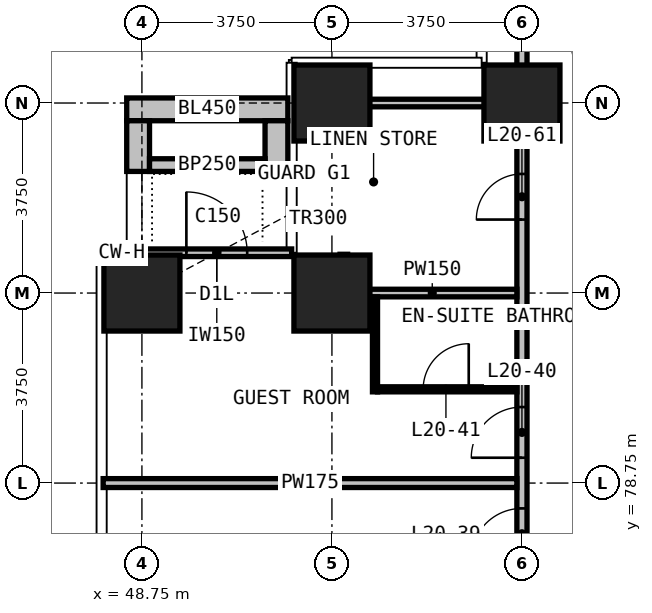
"""IFC4 building model, lengths in metres.
Left out: names, types, materials, properties, quantities, classifications, styles, units other than length and angle.
Written with IfcOpenShell. Run it as: python <this file> out.ifc"""

import sys

from ifc_helpers import new_model, si_unit, direction, frame, frame_2d, origin, origin_2d, place, context, subcontext, project, spatial, rectangle, extrude, element, fill, save


model = new_model("IFC4")
c1 = context("Model", 3, precision=1e-05, world=origin(), true_north=direction((0.0, 1.0)))
c2 = subcontext(c1, "Body", "Model", "MODEL_VIEW")
j1 = project(units=[si_unit("LENGTHUNIT", "METRE"), si_unit("PLANEANGLEUNIT", "RADIAN")], contexts=[c1])
p1 = place(None, origin())
s1 = spatial("IfcSite", under=j1, at=p1, CompositionType="ELEMENT")
p2 = place(p1, origin())
s2 = spatial("IfcBuilding", under=s1, at=p2, CompositionType="ELEMENT")
p3 = place(p2, frame((0.0, 0.0, 85.7)))
s3 = spatial("IfcBuildingStorey", under=s2, at=p3, CompositionType="ELEMENT", Elevation=85.7)
for number, where, z_axis, x_axis in (
    (1, (48.75, 82.5, 0.0), (0.0, 0.0, 1.0), (1.0, 0.0, 0.0)),
    (2, (52.5, 82.5, 0.0), (0.0, 0.0, 1.0), (1.0, 0.0, 0.0)),
    (3, (52.5, 86.25, 0.0), (0.0, 0.0, 1.0), (1.0, 0.0, 0.0)),
    (4, (56.25, 86.25, 0.0), (0.0, 0.0, 1.0), (1.0, 0.0, 0.0)),
):
    element("IfcColumn", number, at=place(p3, frame(where, z_axis=z_axis, x_axis=x_axis)), inside=s3, PredefinedType="COLUMN", context=c2, shape_type="SweptSolid", body=[
        extrude(rectangle(XDim=1.5, YDim=1.5, at=origin_2d()), origin(), (0.0, 0.0, 1.0), 3.3),
    ])
p4 = place(p3, frame((48.75, 83.295, 0.0), z_axis=(0.0, 0.0, 1.0), x_axis=(1.0, 0.0, 0.0)))
e5 = element("IfcWall", 5, at=p4, inside=s3, PredefinedType="SOLIDWALL", context=c2, shape_type="SweptSolid", body=[
    extrude(rectangle(XDim=2.955, YDim=0.15, at=frame_2d((1.478, 0.0))), origin(), (0.0, 0.0, 1.0), 3.0),
])
p5 = place(p4, frame((0.877, 0.0, 0.0)))
e6 = element("IfcOpeningElement", 6, at=p5, cuts=e5, PredefinedType="OPENING", context=c2, shape_type="SweptSolid", body=[
    extrude(rectangle(XDim=1.2, YDim=2.0, at=frame_2d((0.6, 1.0))), frame((0.0, 0.085, 0.0), z_axis=(0.0, -1.0, 0.0), x_axis=(1.0, 0.0, 0.0)), (0.0, 0.0, 1.0), 0.17),
])
p6 = place(p3, frame((48.45, 86.125, 0.0), z_axis=(0.0, 0.0, 1.0), x_axis=(1.0, 0.0, 0.0)))
e7 = element("IfcWall", 7, at=p6, inside=s3, PredefinedType="USERDEFINED", context=c2, shape_type="SweptSolid", body=[
    extrude(rectangle(XDim=3.18, YDim=0.45, at=frame_2d((1.59, 0.0))), origin(), (0.0, 0.0, 1.0), 1.1),
])
for number, where, z_axis, x_axis in (
    (8, (48.675, 84.9, 0.0), (0.0, 0.0, 1.0), (0.0, 1.0, 0.0)),
    (9, (51.405, 84.9, 0.0), (0.0, 0.0, 1.0), (0.0, 1.0, 0.0)),
):
    element("IfcWall", number, at=place(p3, frame(where, z_axis=z_axis, x_axis=x_axis)), inside=s3, PredefinedType="USERDEFINED", context=c2, shape_type="SweptSolid", body=[
        extrude(rectangle(XDim=1.0, YDim=0.45, at=frame_2d((0.5, 0.0))), origin(), (0.0, 0.0, 1.0), 1.1),
    ])
p7 = place(p3, frame((48.9, 85.025, 0.0), z_axis=(0.0, 0.0, 1.0), x_axis=(1.0, 0.0, 0.0)))
e10 = element("IfcWall", 10, at=p7, inside=s3, PredefinedType="USERDEFINED", context=c2, shape_type="SweptSolid", body=[
    extrude(rectangle(XDim=2.28, YDim=0.25, at=frame_2d((1.14, 0.0))), origin(), (0.0, 0.0, 1.0), 1.0),
])
p8 = place(p3, frame((56.25, 52.4, 0.0), z_axis=(0.0, 0.0, 1.0), x_axis=(0.0, 1.0, 0.0)))
e11 = element("IfcWall", 11, at=p8, inside=s3, PredefinedType="PARTITIONING", context=c2, shape_type="SweptSolid", body=[
    extrude(rectangle(XDim=33.925, YDim=0.2, at=frame_2d((16.962, 0.0))), origin(), (0.0, 0.0, 1.0), 3.0),
])
p9 = place(p8, frame((2.35, 0.0, 0.0)))
e12 = element("IfcOpeningElement", 12, at=p9, cuts=e11, PredefinedType="OPENING", context=c2, shape_type="SweptSolid", body=[
    extrude(rectangle(XDim=1.0, YDim=2.2, at=frame_2d((0.5, 1.1))), frame((0.0, 0.11, 0.0), z_axis=(0.0, -1.0, 0.0), x_axis=(1.0, 0.0, 0.0)), (0.0, 0.0, 1.0), 0.22),
])
p10 = place(p8, frame((4.35, 0.0, 0.0)))
e13 = element("IfcOpeningElement", 13, at=p10, cuts=e11, PredefinedType="OPENING", context=c2, shape_type="SweptSolid", body=[
    extrude(rectangle(XDim=1.0, YDim=2.2, at=frame_2d((0.5, 1.1))), frame((0.0, 0.11, 0.0), z_axis=(0.0, -1.0, 0.0), x_axis=(1.0, 0.0, 0.0)), (0.0, 0.0, 1.0), 0.22),
])
p11 = place(p8, frame((9.85, 0.0, 0.0)))
e14 = element("IfcOpeningElement", 14, at=p11, cuts=e11, PredefinedType="OPENING", context=c2, shape_type="SweptSolid", body=[
    extrude(rectangle(XDim=1.0, YDim=2.2, at=frame_2d((0.5, 1.1))), frame((0.0, 0.11, 0.0), z_axis=(0.0, -1.0, 0.0), x_axis=(1.0, 0.0, 0.0)), (0.0, 0.0, 1.0), 0.22),
])
p12 = place(p8, frame((11.85, 0.0, 0.0)))
e15 = element("IfcOpeningElement", 15, at=p12, cuts=e11, PredefinedType="OPENING", context=c2, shape_type="SweptSolid", body=[
    extrude(rectangle(XDim=1.0, YDim=2.2, at=frame_2d((0.5, 1.1))), frame((0.0, 0.11, 0.0), z_axis=(0.0, -1.0, 0.0), x_axis=(1.0, 0.0, 0.0)), (0.0, 0.0, 1.0), 0.22),
])
p13 = place(p8, frame((17.35, 0.0, 0.0)))
e16 = element("IfcOpeningElement", 16, at=p13, cuts=e11, PredefinedType="OPENING", context=c2, shape_type="SweptSolid", body=[
    extrude(rectangle(XDim=1.0, YDim=2.2, at=frame_2d((0.5, 1.1))), frame((0.0, 0.11, 0.0), z_axis=(0.0, -1.0, 0.0), x_axis=(1.0, 0.0, 0.0)), (0.0, 0.0, 1.0), 0.22),
])
p14 = place(p8, frame((19.35, 0.0, 0.0)))
e17 = element("IfcOpeningElement", 17, at=p14, cuts=e11, PredefinedType="OPENING", context=c2, shape_type="SweptSolid", body=[
    extrude(rectangle(XDim=1.0, YDim=2.2, at=frame_2d((0.5, 1.1))), frame((0.0, 0.11, 0.0), z_axis=(0.0, -1.0, 0.0), x_axis=(1.0, 0.0, 0.0)), (0.0, 0.0, 1.0), 0.22),
])
p15 = place(p8, frame((24.85, 0.0, 0.0)))
e18 = element("IfcOpeningElement", 18, at=p15, cuts=e11, PredefinedType="OPENING", context=c2, shape_type="SweptSolid", body=[
    extrude(rectangle(XDim=1.0, YDim=2.2, at=frame_2d((0.5, 1.1))), frame((0.0, 0.11, 0.0), z_axis=(0.0, -1.0, 0.0), x_axis=(1.0, 0.0, 0.0)), (0.0, 0.0, 1.0), 0.22),
])
p16 = place(p8, frame((26.85, 0.0, 0.0)))
e19 = element("IfcOpeningElement", 19, at=p16, cuts=e11, PredefinedType="OPENING", context=c2, shape_type="SweptSolid", body=[
    extrude(rectangle(XDim=1.0, YDim=2.2, at=frame_2d((0.5, 1.1))), frame((0.0, 0.11, 0.0), z_axis=(0.0, -1.0, 0.0), x_axis=(1.0, 0.0, 0.0)), (0.0, 0.0, 1.0), 0.22),
])
p17 = place(p8, frame((31.55, 0.0, 0.0)))
e20 = element("IfcOpeningElement", 20, at=p17, cuts=e11, PredefinedType="OPENING", context=c2, shape_type="SweptSolid", body=[
    extrude(rectangle(XDim=0.9, YDim=2.2, at=frame_2d((0.45, 1.1))), frame((0.0, 0.11, 0.0), z_axis=(0.0, -1.0, 0.0), x_axis=(1.0, 0.0, 0.0)), (0.0, 0.0, 1.0), 0.22),
])
p18 = place(p3, frame((56.25, 86.28, 0.0), z_axis=(0.0, 0.0, 1.0), x_axis=(0.0, 1.0, 0.0)))
e21 = element("IfcWall", 21, at=p18, inside=s3, PredefinedType="PARTITIONING", context=c2, shape_type="SweptSolid", body=[
    extrude(rectangle(XDim=4.365, YDim=0.2, at=frame_2d((2.183, 0.0))), origin(), (0.0, 0.0, 1.0), 3.0),
])
p19 = place(p3, frame((47.985, 78.75, 0.0), z_axis=(0.0, 0.0, 1.0), x_axis=(1.0, 0.0, 0.0)))
e22 = element("IfcWall", 22, at=p19, inside=s3, PredefinedType="PARTITIONING", context=c2, shape_type="SweptSolid", body=[
    extrude(rectangle(XDim=8.165, YDim=0.175, at=frame_2d((4.083, 0.0))), origin(), (0.0, 0.0, 1.0), 3.0),
])
p20 = place(p3, frame((52.81, 82.5, 0.0), z_axis=(0.0, 0.0, 1.0), x_axis=(1.0, 0.0, 0.0)))
e23 = element("IfcWall", 23, at=p20, inside=s3, PredefinedType="PARTITIONING", context=c2, shape_type="SweptSolid", body=[
    extrude(rectangle(XDim=3.34, YDim=0.15, at=frame_2d((1.67, 0.0))), origin(), (0.0, 0.0, 1.0), 3.0),
])
p21 = place(p3, frame((51.855, 86.25, 0.0), z_axis=(0.0, 0.0, 1.0), x_axis=(1.0, 0.0, 0.0)))
e24 = element("IfcWall", 24, at=p21, inside=s3, PredefinedType="PARTITIONING", context=c2, shape_type="SweptSolid", body=[
    extrude(rectangle(XDim=4.295, YDim=0.15, at=frame_2d((2.147, 0.0))), origin(), (0.0, 0.0, 1.0), 3.0),
])
p22 = place(p3, frame((52.735, 82.425, 0.0), z_axis=(0.0, 0.0, 1.0), x_axis=(0.0, 1.0, 0.0)))
e25 = element("IfcWall", 25, at=p22, inside=s3, PredefinedType="PARTITIONING", context=c2, shape_type="SweptSolid", body=[
    extrude(rectangle(XDim=0.84, YDim=0.15, at=frame_2d((0.42, 0.0))), origin(), (0.0, 0.0, 1.0), 3.0),
])
p23 = place(p3, frame((53.4, 80.6, 0.0), z_axis=(0.0, 0.0, 1.0), x_axis=(1.0, 0.0, 0.0)))
e26 = element("IfcWall", 26, at=p23, inside=s3, PredefinedType="PARTITIONING", context=c2, shape_type="SweptSolid", body=[
    extrude(rectangle(XDim=2.75, YDim=0.1, at=frame_2d((1.375, 0.0))), origin(), (0.0, 0.0, 1.0), 3.0),
])
p24 = place(p23, frame((0.9, 0.0, 0.0)))
e27 = element("IfcOpeningElement", 27, at=p24, cuts=e26, PredefinedType="OPENING", context=c2, shape_type="SweptSolid", body=[
    extrude(rectangle(XDim=0.9, YDim=2.2, at=frame_2d((0.45, 1.1))), frame((0.0, 0.06, 0.0), z_axis=(0.0, -1.0, 0.0), x_axis=(1.0, 0.0, 0.0)), (0.0, 0.0, 1.0), 0.12),
])
p25 = place(p3, frame((53.35, 80.55, 0.0), z_axis=(0.0, 0.0, 1.0), x_axis=(0.0, 1.0, 0.0)))
e28 = element("IfcWall", 28, at=p25, inside=s3, PredefinedType="PARTITIONING", context=c2, shape_type="SweptSolid", body=[
    extrude(rectangle(XDim=1.875, YDim=0.1, at=frame_2d((0.938, 0.0))), origin(), (0.0, 0.0, 1.0), 3.0),
])
p26 = place(p5, origin())
e29 = element("IfcDoor", 29, at=p26, inside=s3, OperationType="SINGLE_SWING_LEFT", PredefinedType="DOOR", context=c2, shape_type="SweptSolid", body=[
    extrude(rectangle(XDim=1.2, YDim=2.0, at=frame_2d((0.6, 1.0))), frame((0.0, 0.025, 0.0), z_axis=(0.0, -1.0, 0.0), x_axis=(1.0, 0.0, 0.0)), (0.0, 0.0, 1.0), 0.05),
])
fill(e6, e29)
p27 = place(p15, origin())
e30 = element("IfcDoor", 30, at=p27, inside=s3, OperationType="SINGLE_SWING_LEFT", PredefinedType="DOOR", context=c2, shape_type="SweptSolid", body=[
    extrude(rectangle(XDim=1.0, YDim=2.2, at=frame_2d((0.5, 1.1))), frame((0.0, 0.025, 0.0), z_axis=(0.0, -1.0, 0.0), x_axis=(1.0, 0.0, 0.0)), (0.0, 0.0, 1.0), 0.05),
])
fill(e18, e30)
p28 = place(p16, origin())
e31 = element("IfcDoor", 31, at=p28, inside=s3, OperationType="SINGLE_SWING_RIGHT", PredefinedType="DOOR", context=c2, shape_type="SweptSolid", body=[
    extrude(rectangle(XDim=1.0, YDim=2.2, at=frame_2d((0.5, 1.1))), frame((0.0, 0.025, 0.0), z_axis=(0.0, -1.0, 0.0), x_axis=(1.0, 0.0, 0.0)), (0.0, 0.0, 1.0), 0.05),
])
fill(e19, e31)
p29 = place(p24, origin())
e32 = element("IfcDoor", 32, at=p29, inside=s3, OperationType="SINGLE_SWING_RIGHT", PredefinedType="DOOR", context=c2, shape_type="SweptSolid", body=[
    extrude(rectangle(XDim=0.9, YDim=2.2, at=frame_2d((0.45, 1.1))), frame((0.0, 0.025, 0.0), z_axis=(0.0, -1.0, 0.0), x_axis=(1.0, 0.0, 0.0)), (0.0, 0.0, 1.0), 0.05),
])
fill(e27, e32)
p30 = place(p17, origin())
e33 = element("IfcDoor", 33, at=p30, inside=s3, OperationType="SINGLE_SWING_RIGHT", PredefinedType="DOOR", context=c2, shape_type="SweptSolid", body=[
    extrude(rectangle(XDim=0.9, YDim=2.2, at=frame_2d((0.45, 1.1))), frame((0.0, 0.025, 0.0), z_axis=(0.0, -1.0, 0.0), x_axis=(1.0, 0.0, 0.0)), (0.0, 0.0, 1.0), 0.05),
])
fill(e20, e33)
save(model, sys.argv[1])
